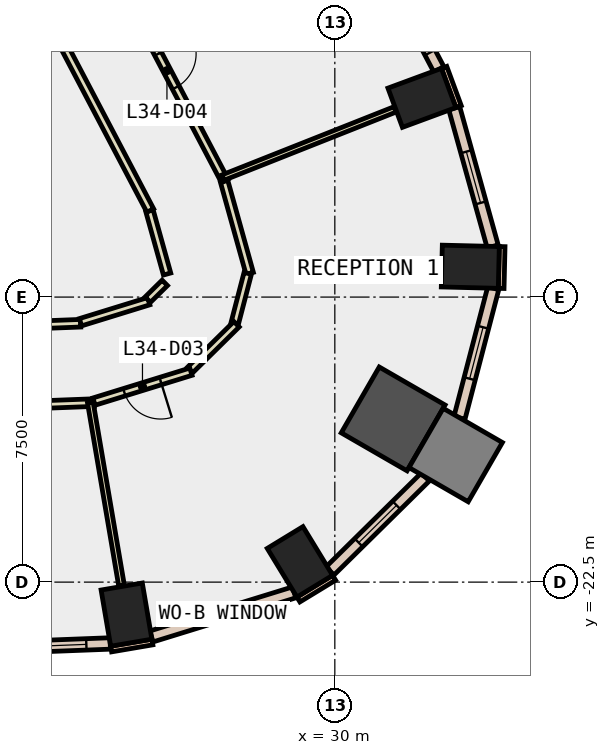
"""IFC4 building model, lengths in metres.
Left out: names, types, materials, properties, quantities, classifications, styles, units other than length and angle.
Written with IfcOpenShell. Run it as: python <this file> out.ifc"""

import sys

from ifc_helpers import new_model, si_unit, direction, frame, frame_2d, origin, origin_2d, place, context, subcontext, project, spatial, rectangle, extrude, element, fill, save


model = new_model("IFC4")
c1 = context("Model", 3, precision=1e-05, world=origin(), true_north=direction((0.0, 1.0)))
c2 = subcontext(c1, "Body", "Model", "MODEL_VIEW")
j1 = project(units=[si_unit("LENGTHUNIT", "METRE"), si_unit("PLANEANGLEUNIT", "RADIAN")], contexts=[c1])
p1 = place(None, origin())
s1 = spatial("IfcSite", under=j1, at=p1, CompositionType="ELEMENT")
p2 = place(p1, origin())
s2 = spatial("IfcBuilding", under=s1, at=p2, CompositionType="ELEMENT")
p3 = place(p2, frame((0.0, 0.0, 155.0)))
s3 = spatial("IfcBuildingStorey", under=s2, at=p3, CompositionType="ELEMENT", Elevation=155.0)
for number, where, z_axis, x_axis in (
    (1, (24.518, -23.355, -0.4), (0.0, 0.0, 1.0), (0.986, 0.168, 0.0)),
    (2, (29.082, -21.967, -0.4), (0.0, 0.0, 1.0), (0.854, 0.521, 0.0)),
):
    element("IfcColumn", number, at=place(p3, frame(where, z_axis=z_axis, x_axis=x_axis)), inside=s3, PredefinedType="COLUMN", context=c2, shape_type="SweptSolid", body=[
        extrude(rectangle(XDim=1.1, YDim=1.5, at=origin_2d()), origin(), (0.0, 0.0, 1.0), 4.2),
    ])
p4 = place(p3, frame((31.535, -18.206, -0.4), z_axis=(0.0, 0.0, 1.0), x_axis=(-0.866025403784, 0.5, 0.0)))
e3 = element("IfcColumn", 3, at=p4, inside=s3, PredefinedType="COLUMN", context=c2, shape_type="SweptSolid", body=[
    extrude(rectangle(XDim=2.0, YDim=2.0, at=origin_2d()), origin(), (0.0, 0.0, 1.0), 4.2),
])
for number, where, z_axis, x_axis in (
    (4, (33.565, -14.202, -0.4), (0.0, 0.0, 1.0), (0.024, 1.0, 0.0)),
    (5, (32.292, -9.758, -0.4), (0.0, 0.0, 1.0), (-0.347, 0.938, 0.0)),
):
    element("IfcColumn", number, at=place(p3, frame(where, z_axis=z_axis, x_axis=x_axis)), inside=s3, PredefinedType="COLUMN", context=c2, shape_type="SweptSolid", body=[
        extrude(rectangle(XDim=1.1, YDim=1.5, at=origin_2d()), origin(), (0.0, 0.0, 1.0), 4.2),
    ])
p5 = place(p3, frame((33.18, -19.156, -0.4), z_axis=(0.0, 0.0, 1.0), x_axis=(-0.866025403784, 0.5, 0.0)))
e6 = element("IfcColumn", 6, at=p5, inside=s3, PredefinedType="COLUMN", context=c2, shape_type="SweptSolid", body=[
    extrude(rectangle(XDim=1.8, YDim=1.8, at=origin_2d()), origin(), (0.0, 0.0, 1.0), 4.2),
])
p6 = place(p3, frame((33.256, -9.988, 0.0), z_axis=(0.0, 0.0, 1.0), x_axis=(-0.346425160624, 0.93807761304, 0.0)))
e7 = element("IfcWall", 7, at=p6, inside=s3, PredefinedType="STANDARD", context=c2, shape_type="SweptSolid", body=[
    extrude(rectangle(XDim=1.1, YDim=0.15, at=frame_2d((0.55, 0.0))), origin(), (0.0, 0.0, 1.0), 3.8),
])
p7 = place(p3, frame((24.114, -24.261, 0.0), z_axis=(0.0, 0.0, 1.0), x_axis=(0.985763338892, 0.168138751323, 0.0)))
e8 = element("IfcWall", 8, at=p7, inside=s3, PredefinedType="STANDARD", context=c2, shape_type="SweptSolid", body=[
    extrude(rectangle(XDim=1.101, YDim=0.15, at=frame_2d((0.55, 0.0))), origin(), (0.0, 0.0, 1.0), 3.8),
])
p8 = place(p3, frame((29.042, -22.957, 0.0), z_axis=(0.0, 0.0, 1.0), x_axis=(0.854005542721, 0.520263907071, 0.0)))
e9 = element("IfcWall", 9, at=p8, inside=s3, PredefinedType="STANDARD", context=c2, shape_type="SweptSolid", body=[
    extrude(rectangle(XDim=1.099, YDim=0.15, at=frame_2d((0.55, 0.0))), origin(), (0.0, 0.0, 1.0), 3.8),
])
p9 = place(p3, frame((34.377, -14.772, 0.0), z_axis=(0.0, 0.0, 1.0), x_axis=(0.023744690764, 0.999718055084, 0.0)))
e10 = element("IfcWall", 10, at=p9, inside=s3, PredefinedType="STANDARD", context=c2, shape_type="SweptSolid", body=[
    extrude(rectangle(XDim=1.1, YDim=0.15, at=frame_2d((0.55, 0.0))), origin(), (0.0, 0.0, 1.0), 3.8),
])
p10 = place(p3, frame((16.778, -24.395, 0.0), z_axis=(0.0, 0.0, 1.0), x_axis=(0.999262356942, 0.038402369711, 0.0)))
e11 = element("IfcWall", 11, at=p10, inside=s3, PredefinedType="STANDARD", context=c2, shape_type="SweptSolid", body=[
    extrude(rectangle(XDim=7.317, YDim=0.3, at=frame_2d((3.659, 0.0))), origin(), (0.0, 0.0, 1.0), 3.8),
])
p11 = place(p10, frame((0.629, 0.0, 0.9)))
e12 = element("IfcOpeningElement", 12, at=p11, cuts=e11, PredefinedType="OPENING", context=c2, shape_type="SweptSolid", body=[
    extrude(rectangle(XDim=2.4, YDim=2.6, at=frame_2d((1.2, 1.3))), frame((0.0, 0.16, 0.0), z_axis=(0.0, -1.0, 0.0), x_axis=(1.0, 0.0, 0.0)), (0.0, 0.0, 1.0), 0.32),
])
p12 = place(p10, frame((4.288, 0.0, 0.9)))
e13 = element("IfcOpeningElement", 13, at=p12, cuts=e11, PredefinedType="OPENING", context=c2, shape_type="SweptSolid", body=[
    extrude(rectangle(XDim=2.4, YDim=2.6, at=frame_2d((1.2, 1.3))), frame((0.0, 0.16, 0.0), z_axis=(0.0, -1.0, 0.0), x_axis=(1.0, 0.0, 0.0)), (0.0, 0.0, 1.0), 0.32),
])
p13 = place(p3, frame((25.173, -23.93, 0.0), z_axis=(0.0, 0.0, 1.0), x_axis=(0.955473661147, 0.295076401723, 0.0)))
e14 = element("IfcWall", 14, at=p13, inside=s3, PredefinedType="STANDARD", context=c2, shape_type="SweptSolid", body=[
    extrude(rectangle(XDim=3.931, YDim=0.3, at=frame_2d((1.965, 0.0))), origin(), (0.0, 0.0, 1.0), 3.8),
])
p14 = place(p13, frame((1.266, 0.0, 0.9)))
e15 = element("IfcOpeningElement", 15, at=p14, cuts=e14, PredefinedType="OPENING", context=c2, shape_type="SweptSolid", body=[
    extrude(rectangle(XDim=1.4, YDim=2.6, at=frame_2d((0.7, 1.3))), frame((0.0, 0.16, 0.0), z_axis=(0.0, -1.0, 0.0), x_axis=(1.0, 0.0, 0.0)), (0.0, 0.0, 1.0), 0.32),
])
p15 = place(p3, frame((29.872, -22.207, 0.0), z_axis=(0.0, 0.0, 1.0), x_axis=(0.712043314899, 0.702135540838, 0.0)))
e16 = element("IfcWall", 16, at=p15, inside=s3, PredefinedType="STANDARD", context=c2, shape_type="SweptSolid", body=[
    extrude(rectangle(XDim=3.524, YDim=0.3, at=frame_2d((1.762, 0.0))), origin(), (0.0, 0.0, 1.0), 3.8),
])
p16 = place(p15, frame((1.062, 0.0, 0.9)))
e17 = element("IfcOpeningElement", 17, at=p16, cuts=e16, PredefinedType="OPENING", context=c2, shape_type="SweptSolid", body=[
    extrude(rectangle(XDim=1.4, YDim=2.6, at=frame_2d((0.7, 1.3))), frame((0.0, 0.16, 0.0), z_axis=(0.0, -1.0, 0.0), x_axis=(1.0, 0.0, 0.0)), (0.0, 0.0, 1.0), 0.32),
])
p17 = place(p3, frame((33.28, -18.176, 0.0), z_axis=(0.0, 0.0, 1.0), x_axis=(0.252255494168, 0.967660666588, 0.0)))
e18 = element("IfcWall", 18, at=p17, inside=s3, PredefinedType="STANDARD", context=c2, shape_type="SweptSolid", body=[
    extrude(rectangle(XDim=3.524, YDim=0.3, at=frame_2d((1.762, 0.0))), origin(), (0.0, 0.0, 1.0), 3.8),
])
p18 = place(p17, frame((1.062, 0.0, 0.9)))
e19 = element("IfcOpeningElement", 19, at=p18, cuts=e18, PredefinedType="OPENING", context=c2, shape_type="SweptSolid", body=[
    extrude(rectangle(XDim=1.4, YDim=2.6, at=frame_2d((0.7, 1.3))), frame((0.0, 0.16, 0.0), z_axis=(0.0, -1.0, 0.0), x_axis=(1.0, 0.0, 0.0)), (0.0, 0.0, 1.0), 0.32),
])
p19 = place(p3, frame((34.154, -13.667, 0.0), z_axis=(0.0, 0.0, 1.0), x_axis=(-0.26799398221, 0.963420585985, 0.0)))
e20 = element("IfcWall", 20, at=p19, inside=s3, PredefinedType="STANDARD", context=c2, shape_type="SweptSolid", body=[
    extrude(rectangle(XDim=3.776, YDim=0.3, at=frame_2d((1.888, 0.0))), origin(), (0.0, 0.0, 1.0), 3.8),
])
p20 = place(p19, frame((1.188, 0.0, 0.9)))
e21 = element("IfcOpeningElement", 21, at=p20, cuts=e20, PredefinedType="OPENING", context=c2, shape_type="SweptSolid", body=[
    extrude(rectangle(XDim=1.4, YDim=2.6, at=frame_2d((0.7, 1.3))), frame((0.0, 0.16, 0.0), z_axis=(0.0, -1.0, 0.0), x_axis=(1.0, 0.0, 0.0)), (0.0, 0.0, 1.0), 0.32),
])
p21 = place(p3, frame((32.737, -9.008, 0.0), z_axis=(0.0, 0.0, 1.0), x_axis=(-0.465104650407, 0.885255705528, 0.0)))
e22 = element("IfcWall", 22, at=p21, inside=s3, PredefinedType="STANDARD", context=c2, shape_type="SweptSolid", body=[
    extrude(rectangle(XDim=5.99, YDim=0.3, at=frame_2d((2.995, 0.0))), origin(), (0.0, 0.0, 1.0), 3.8),
])
p22 = place(p21, frame((0.498, 0.0, 0.9)))
e23 = element("IfcOpeningElement", 23, at=p22, cuts=e22, PredefinedType="OPENING", context=c2, shape_type="SweptSolid", body=[
    extrude(rectangle(XDim=2.0, YDim=2.6, at=frame_2d((1.0, 1.3))), frame((0.0, 0.16, 0.0), z_axis=(0.0, -1.0, 0.0), x_axis=(1.0, 0.0, 0.0)), (0.0, 0.0, 1.0), 0.32),
])
p23 = place(p21, frame((3.493, 0.0, 0.9)))
e24 = element("IfcOpeningElement", 24, at=p23, cuts=e22, PredefinedType="OPENING", context=c2, shape_type="SweptSolid", body=[
    extrude(rectangle(XDim=2.0, YDim=2.6, at=frame_2d((1.0, 1.3))), frame((0.0, 0.16, 0.0), z_axis=(0.0, -1.0, 0.0), x_axis=(1.0, 0.0, 0.0)), (0.0, 0.0, 1.0), 0.32),
])
p24 = place(p3, frame((15.972, -15.97, 0.0), z_axis=(0.0, 0.0, 1.0), x_axis=(0.999262695969, 0.038393546916, 0.0)))
e25 = element("IfcWall", 25, at=p24, inside=s3, PredefinedType="PARTITIONING", context=c2, shape_type="SweptSolid", body=[
    extrude(rectangle(XDim=7.344, YDim=0.2, at=frame_2d((3.672, 0.0))), origin(), (0.0, 0.0, 1.0), 3.8),
])
p25 = place(p3, frame((23.307, -15.662, 0.0), z_axis=(0.0, 0.0, 1.0), x_axis=(0.955548436851, 0.294834164966, 0.0)))
e26 = element("IfcWall", 26, at=p25, inside=s3, PredefinedType="PARTITIONING", context=c2, shape_type="SweptSolid", body=[
    extrude(rectangle(XDim=1.88, YDim=0.2, at=frame_2d((0.94, 0.0))), origin(), (0.0, 0.0, 1.0), 3.8),
])
p26 = place(p3, frame((25.079, -15.067, 0.0), z_axis=(0.0, 0.0, 1.0), x_axis=(0.711758647644, 0.702424108003, 0.0)))
e27 = element("IfcWall", 27, at=p26, inside=s3, PredefinedType="PARTITIONING", context=c2, shape_type="SweptSolid", body=[
    extrude(rectangle(XDim=0.628, YDim=0.2, at=frame_2d((0.314, 0.0))), origin(), (0.0, 0.0, 1.0), 3.8),
])
p27 = place(p3, frame((25.586, -14.393, 0.0), z_axis=(0.0, 0.0, 1.0), x_axis=(-0.268139825244, 0.963380005044, 0.0)))
e28 = element("IfcWall", 28, at=p27, inside=s3, PredefinedType="PARTITIONING", context=c2, shape_type="SweptSolid", body=[
    extrude(rectangle(XDim=1.726, YDim=0.2, at=frame_2d((0.863, 0.0))), origin(), (0.0, 0.0, 1.0), 3.8),
])
p28 = place(p3, frame((25.143, -12.722, 0.0), z_axis=(0.0, 0.0, 1.0), x_axis=(-0.465089990515, 0.885263407536, 0.0)))
e29 = element("IfcWall", 29, at=p28, inside=s3, PredefinedType="PARTITIONING", context=c2, shape_type="SweptSolid", body=[
    extrude(rectangle(XDim=6.24, YDim=0.2, at=frame_2d((3.12, 0.0))), origin(), (0.0, 0.0, 1.0), 3.8),
])
p29 = place(p3, frame((23.667, -17.776, 0.0), z_axis=(0.0, 0.0, 1.0), x_axis=(-0.999264080977, -0.038357482575, 0.0)))
e30 = element("IfcWall", 30, at=p29, inside=s3, PredefinedType="PARTITIONING", context=c2, shape_type="SweptSolid", body=[
    extrude(rectangle(XDim=7.562, YDim=0.2, at=frame_2d((3.781, 0.0))), origin(), (0.0, 0.0, 1.0), 3.8),
])
p30 = place(p29, frame((3.356, 0.0, 0.0)))
e31 = element("IfcOpeningElement", 31, at=p30, cuts=e30, PredefinedType="OPENING", context=c2, shape_type="SweptSolid", body=[
    extrude(rectangle(XDim=1.0, YDim=2.1, at=frame_2d((0.5, 1.05))), frame((0.0, 0.11, 0.0), z_axis=(0.0, -1.0, 0.0), x_axis=(1.0, 0.0, 0.0)), (0.0, 0.0, 1.0), 0.22),
])
p31 = place(p3, frame((27.086, -11.952, 0.0), z_axis=(0.0, 0.0, 1.0), x_axis=(0.267909096687, -0.963444194498, 0.0)))
e32 = element("IfcWall", 32, at=p31, inside=s3, PredefinedType="PARTITIONING", context=c2, shape_type="SweptSolid", body=[
    extrude(rectangle(XDim=2.516, YDim=0.2, at=frame_2d((1.258, 0.0))), origin(), (0.0, 0.0, 1.0), 3.8),
])
p32 = place(p3, frame((27.708, -14.376, 0.0), z_axis=(0.0, 0.0, 1.0), x_axis=(-0.25159336549, -0.967833032316, 0.0)))
e33 = element("IfcWall", 33, at=p32, inside=s3, PredefinedType="PARTITIONING", context=c2, shape_type="SweptSolid", body=[
    extrude(rectangle(XDim=1.356, YDim=0.2, at=frame_2d((0.678, 0.0))), origin(), (0.0, 0.0, 1.0), 3.8),
])
p33 = place(p3, frame((27.413, -15.715, 0.0), z_axis=(0.0, 0.0, 1.0), x_axis=(-0.712339678389, -0.701834868465, 0.0)))
e34 = element("IfcWall", 34, at=p33, inside=s3, PredefinedType="PARTITIONING", context=c2, shape_type="SweptSolid", body=[
    extrude(rectangle(XDim=1.72, YDim=0.2, at=frame_2d((0.86, 0.0))), origin(), (0.0, 0.0, 1.0), 3.8),
])
p34 = place(p3, frame((26.213, -16.963, 0.0), z_axis=(0.0, 0.0, 1.0), x_axis=(-0.955509582123, -0.294960062501, 0.0)))
e35 = element("IfcWall", 35, at=p34, inside=s3, PredefinedType="PARTITIONING", context=c2, shape_type="SweptSolid", body=[
    extrude(rectangle(XDim=2.668, YDim=0.2, at=frame_2d((1.334, 0.0))), origin(), (0.0, 0.0, 1.0), 3.8),
])
p35 = place(p34, frame((0.834, 0.0, 0.0)))
e36 = element("IfcOpeningElement", 36, at=p35, cuts=e35, PredefinedType="OPENING", context=c2, shape_type="SweptSolid", body=[
    extrude(rectangle(XDim=1.0, YDim=2.1, at=frame_2d((0.5, 1.05))), frame((0.0, 0.11, 0.0), z_axis=(0.0, -1.0, 0.0), x_axis=(1.0, 0.0, 0.0)), (0.0, 0.0, 1.0), 0.22),
])
p36 = place(p3, frame((24.059, -6.143, 0.0), z_axis=(0.0, 0.0, 1.0), x_axis=(0.464993808059, -0.885313932154, 0.0)))
e37 = element("IfcWall", 37, at=p36, inside=s3, PredefinedType="PARTITIONING", context=c2, shape_type="SweptSolid", body=[
    extrude(rectangle(XDim=6.552, YDim=0.2, at=frame_2d((3.276, 0.0))), origin(), (0.0, 0.0, 1.0), 3.8),
])
p37 = place(p36, frame((2.776, 0.0, 0.0)))
e38 = element("IfcOpeningElement", 38, at=p37, cuts=e37, PredefinedType="OPENING", context=c2, shape_type="SweptSolid", body=[
    extrude(rectangle(XDim=1.0, YDim=2.1, at=frame_2d((0.5, 1.05))), frame((0.0, 0.11, 0.0), z_axis=(0.0, -1.0, 0.0), x_axis=(1.0, 0.0, 0.0)), (0.0, 0.0, 1.0), 0.22),
])
p38 = place(p3, frame((23.567, -17.779, 0.0), z_axis=(0.0, 0.0, 1.0), x_axis=(0.168027663896, -0.985782280306, 0.0)))
e39 = element("IfcWall", 39, at=p38, inside=s3, PredefinedType="PARTITIONING", context=c2, shape_type="SweptSolid", body=[
    extrude(rectangle(XDim=4.886, YDim=0.15, at=frame_2d((2.443, 0.0))), origin(), (0.0, 0.0, 1.0), 3.8),
])
p39 = place(p3, frame((27.059, -11.855, 0.0), z_axis=(0.0, 0.0, 1.0), x_axis=(0.92964843089, 0.368447818481, 0.0)))
e40 = element("IfcWall", 40, at=p39, inside=s3, PredefinedType="PARTITIONING", context=c2, shape_type="SweptSolid", body=[
    extrude(rectangle(XDim=4.866, YDim=0.15, at=frame_2d((2.433, 0.0))), origin(), (0.0, 0.0, 1.0), 3.8),
])
p40 = place(p12, origin())
e41 = element("IfcWindow", 41, at=p40, inside=s3, PartitioningType="SINGLE_PANEL", PredefinedType="WINDOW", context=c2, shape_type="SweptSolid", body=[
    extrude(rectangle(XDim=2.4, YDim=2.6, at=frame_2d((1.2, 1.3))), frame((0.0, 0.03, 0.0), z_axis=(0.0, -1.0, 0.0), x_axis=(1.0, 0.0, 0.0)), (0.0, 0.0, 1.0), 0.06),
])
fill(e13, e41)
p41 = place(p14, origin())
e42 = element("IfcWindow", 42, at=p41, inside=s3, PartitioningType="SINGLE_PANEL", PredefinedType="WINDOW", context=c2, shape_type="SweptSolid", body=[
    extrude(rectangle(XDim=1.4, YDim=2.6, at=frame_2d((0.7, 1.3))), frame((0.0, 0.03, 0.0), z_axis=(0.0, -1.0, 0.0), x_axis=(1.0, 0.0, 0.0)), (0.0, 0.0, 1.0), 0.06),
])
fill(e15, e42)
p42 = place(p16, origin())
e43 = element("IfcWindow", 43, at=p42, inside=s3, PartitioningType="SINGLE_PANEL", PredefinedType="WINDOW", context=c2, shape_type="SweptSolid", body=[
    extrude(rectangle(XDim=1.4, YDim=2.6, at=frame_2d((0.7, 1.3))), frame((0.0, 0.03, 0.0), z_axis=(0.0, -1.0, 0.0), x_axis=(1.0, 0.0, 0.0)), (0.0, 0.0, 1.0), 0.06),
])
fill(e17, e43)
p43 = place(p18, origin())
e44 = element("IfcWindow", 44, at=p43, inside=s3, PartitioningType="SINGLE_PANEL", PredefinedType="WINDOW", context=c2, shape_type="SweptSolid", body=[
    extrude(rectangle(XDim=1.4, YDim=2.6, at=frame_2d((0.7, 1.3))), frame((0.0, 0.03, 0.0), z_axis=(0.0, -1.0, 0.0), x_axis=(1.0, 0.0, 0.0)), (0.0, 0.0, 1.0), 0.06),
])
fill(e19, e44)
p44 = place(p20, origin())
e45 = element("IfcWindow", 45, at=p44, inside=s3, PartitioningType="SINGLE_PANEL", PredefinedType="WINDOW", context=c2, shape_type="SweptSolid", body=[
    extrude(rectangle(XDim=1.4, YDim=2.6, at=frame_2d((0.7, 1.3))), frame((0.0, 0.03, 0.0), z_axis=(0.0, -1.0, 0.0), x_axis=(1.0, 0.0, 0.0)), (0.0, 0.0, 1.0), 0.06),
])
fill(e21, e45)
p45 = place(p22, origin())
e46 = element("IfcWindow", 46, at=p45, inside=s3, PartitioningType="SINGLE_PANEL", PredefinedType="WINDOW", context=c2, shape_type="SweptSolid", body=[
    extrude(rectangle(XDim=2.0, YDim=2.6, at=frame_2d((1.0, 1.3))), frame((0.0, 0.03, 0.0), z_axis=(0.0, -1.0, 0.0), x_axis=(1.0, 0.0, 0.0)), (0.0, 0.0, 1.0), 0.06),
])
fill(e23, e46)
p46 = place(p35, origin())
e47 = element("IfcDoor", 47, at=p46, inside=s3, OperationType="SINGLE_SWING_LEFT", PredefinedType="DOOR", context=c2, shape_type="SweptSolid", body=[
    extrude(rectangle(XDim=1.0, YDim=2.1, at=frame_2d((0.5, 1.05))), frame((0.0, 0.025, 0.0), z_axis=(0.0, -1.0, 0.0), x_axis=(1.0, 0.0, 0.0)), (0.0, 0.0, 1.0), 0.05),
])
fill(e36, e47)
p47 = place(p37, origin())
e48 = element("IfcDoor", 48, at=p47, inside=s3, OperationType="SINGLE_SWING_LEFT", PredefinedType="DOOR", context=c2, shape_type="SweptSolid", body=[
    extrude(rectangle(XDim=1.0, YDim=2.1, at=frame_2d((0.5, 1.05))), frame((0.0, 0.025, 0.0), z_axis=(0.0, -1.0, 0.0), x_axis=(1.0, 0.0, 0.0)), (0.0, 0.0, 1.0), 0.05),
])
fill(e38, e48)
save(model, sys.argv[1])
